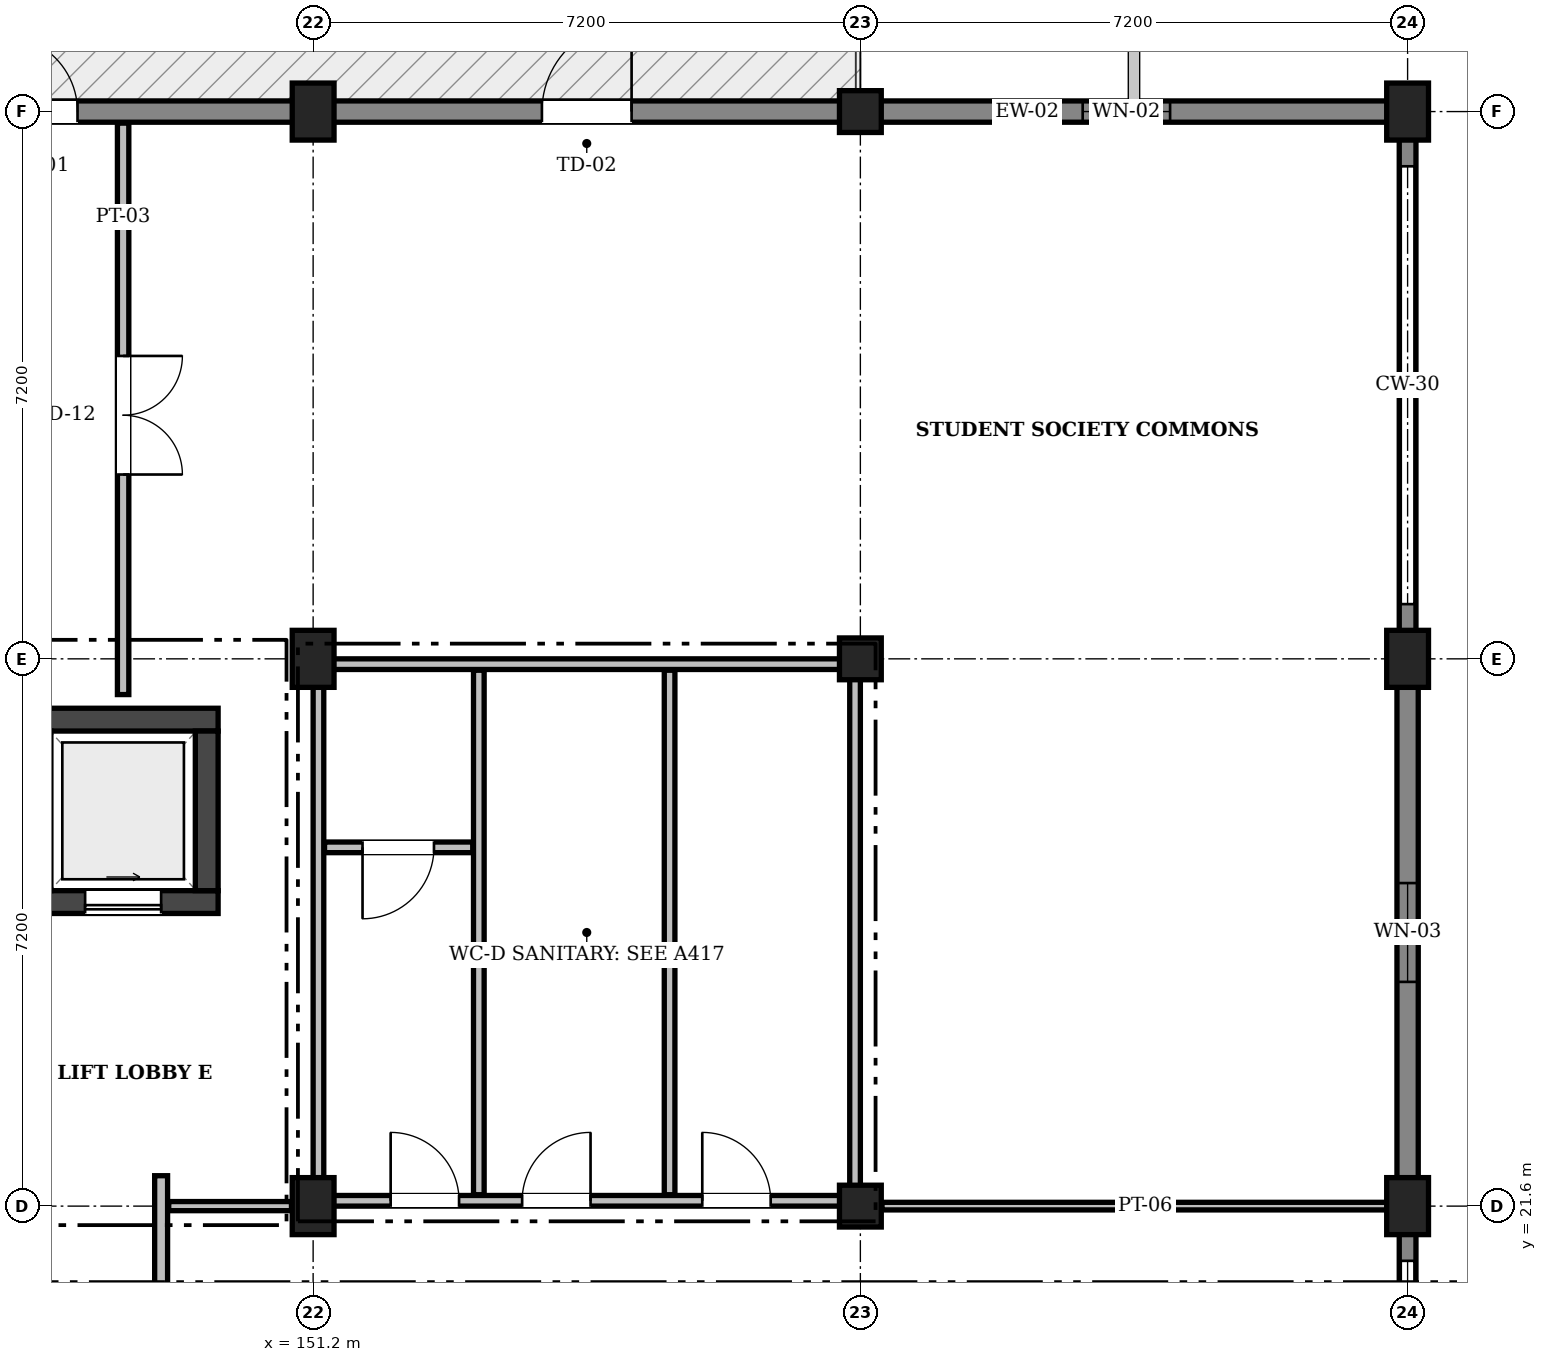
"""IFC4 building model, lengths in metres.
Left out: names, types, materials, properties, quantities, classifications, styles, units other than length and angle.
Written with IfcOpenShell. Run it as: python <this file> out.ifc"""

import sys

from ifc_helpers import new_model, si_unit, direction, frame, frame_2d, origin, origin_2d, place, context, subcontext, project, spatial, rectangle, extrude, element, fill, save


model = new_model("IFC4")
c1 = context("Model", 3, precision=1e-05, world=origin(), true_north=direction((0.0, 1.0)))
c2 = subcontext(c1, "Body", "Model", "MODEL_VIEW")
j1 = project(units=[si_unit("LENGTHUNIT", "METRE"), si_unit("PLANEANGLEUNIT", "RADIAN")], contexts=[c1])
p1 = place(None, origin())
s1 = spatial("IfcSite", under=j1, at=p1, CompositionType="ELEMENT")
p2 = place(p1, origin())
s2 = spatial("IfcBuilding", under=s1, at=p2, CompositionType="ELEMENT")
p3 = place(p2, frame((0.0, 0.0, 9.6)))
s3 = spatial("IfcBuildingStorey", under=s2, at=p3, CompositionType="ELEMENT", Elevation=9.6)
for number, where, z_axis, x_axis in (
    (1, (151.2, 21.6, 0.0), (0.0, 0.0, 1.0), (1.0, 0.0, 0.0)),
    (2, (151.2, 28.8, 0.0), (0.0, 0.0, 1.0), (1.0, 0.0, 0.0)),
    (3, (151.2, 36.0, 0.0), (0.0, 0.0, 1.0), (1.0, 0.0, 0.0)),
):
    element("IfcColumn", number, at=place(p3, frame(where, z_axis=z_axis, x_axis=x_axis)), inside=s3, PredefinedType="COLUMN", context=c2, shape_type="SweptSolid", body=[
        extrude(rectangle(XDim=0.55, YDim=0.75, at=origin_2d()), origin(), (0.0, 0.0, 1.0), 4.8),
    ])
for number, where, z_axis, x_axis in (
    (4, (158.4, 21.6, 0.0), (0.0, 0.0, 1.0), (1.0, 0.0, 0.0)),
    (5, (158.4, 28.8, 0.0), (0.0, 0.0, 1.0), (1.0, 0.0, 0.0)),
    (6, (158.4, 36.0, 0.0), (0.0, 0.0, 1.0), (1.0, 0.0, 0.0)),
):
    element("IfcColumn", number, at=place(p3, frame(where, z_axis=z_axis, x_axis=x_axis)), inside=s3, PredefinedType="COLUMN", context=c2, shape_type="SweptSolid", body=[
        extrude(rectangle(XDim=0.55, YDim=0.55, at=origin_2d()), origin(), (0.0, 0.0, 1.0), 4.8),
    ])
for number, where, z_axis, x_axis in (
    (7, (165.6, 21.6, 0.0), (0.0, 0.0, 1.0), (1.0, 0.0, 0.0)),
    (8, (165.6, 28.8, 0.0), (0.0, 0.0, 1.0), (1.0, 0.0, 0.0)),
    (9, (165.6, 36.0, 0.0), (0.0, 0.0, 1.0), (1.0, 0.0, 0.0)),
):
    element("IfcColumn", number, at=place(p3, frame(where, z_axis=z_axis, x_axis=x_axis)), inside=s3, PredefinedType="COLUMN", context=c2, shape_type="SweptSolid", body=[
        extrude(rectangle(XDim=0.55, YDim=0.75, at=origin_2d()), origin(), (0.0, 0.0, 1.0), 4.8),
    ])
p4 = place(p3, frame((144.0, 36.0, 0.0), z_axis=(0.0, 0.0, 1.0), x_axis=(1.0, 0.0, 0.0)))
e10 = element("IfcWall", 10, at=p4, inside=s3, PredefinedType="SOLIDWALL", context=c2, shape_type="SweptSolid", body=[
    extrude(rectangle(XDim=7.2, YDim=0.28, at=frame_2d((3.6, 0.0))), origin(), (0.0, 0.0, 1.0), 4.52),
])
p5 = place(p4, frame((3.1, 0.0, 0.0)))
e11 = element("IfcOpeningElement", 11, at=p5, cuts=e10, PredefinedType="OPENING", context=c2, shape_type="SweptSolid", body=[
    extrude(rectangle(XDim=1.0, YDim=2.15, at=frame_2d((0.5, 1.075))), frame((0.0, 0.152, 0.0), z_axis=(0.0, -1.0, 0.0), x_axis=(1.0, 0.0, 0.0)), (0.0, 0.0, 1.0), 0.304),
])
p6 = place(p3, frame((151.2, 36.0, 0.0), z_axis=(0.0, 0.0, 1.0), x_axis=(1.0, 0.0, 0.0)))
e12 = element("IfcWall", 12, at=p6, inside=s3, PredefinedType="SOLIDWALL", context=c2, shape_type="SweptSolid", body=[
    extrude(rectangle(XDim=7.2, YDim=0.28, at=frame_2d((3.6, 0.0))), origin(), (0.0, 0.0, 1.0), 4.52),
])
p7 = place(p6, frame((3.01, 0.0, 0.0)))
e13 = element("IfcOpeningElement", 13, at=p7, cuts=e12, PredefinedType="OPENING", context=c2, shape_type="SweptSolid", body=[
    extrude(rectangle(XDim=1.18, YDim=2.18, at=frame_2d((0.59, 1.09))), frame((0.0, 0.152, 0.0), z_axis=(0.0, -1.0, 0.0), x_axis=(1.0, 0.0, 0.0)), (0.0, 0.0, 1.0), 0.304),
])
p8 = place(p3, frame((158.4, 36.0, 0.0), z_axis=(0.0, 0.0, 1.0), x_axis=(1.0, 0.0, 0.0)))
e14 = element("IfcWall", 14, at=p8, inside=s3, PredefinedType="SOLIDWALL", context=c2, shape_type="SweptSolid", body=[
    extrude(rectangle(XDim=7.35, YDim=0.28, at=frame_2d((3.675, 0.0))), origin(), (0.0, 0.0, 1.0), 4.52),
])
p9 = place(p8, frame((2.925, 0.0, 0.95)))
e15 = element("IfcOpeningElement", 15, at=p9, cuts=e14, PredefinedType="OPENING", context=c2, shape_type="SweptSolid", body=[
    extrude(rectangle(XDim=1.15, YDim=1.3, at=frame_2d((0.575, 0.65))), frame((0.0, 0.152, 0.0), z_axis=(0.0, -1.0, 0.0), x_axis=(1.0, 0.0, 0.0)), (0.0, 0.0, 1.0), 0.304),
])
p10 = place(p3, frame((165.6, 35.848, 0.0), z_axis=(0.0, 0.0, 1.0), x_axis=(0.0, -1.0, 0.0)))
e16 = element("IfcWall", 16, at=p10, inside=s3, PredefinedType="SOLIDWALL", context=c2, shape_type="SweptSolid", body=[
    extrude(rectangle(XDim=7.048, YDim=0.22, at=frame_2d((3.524, 0.0))), origin(), (0.0, 0.0, 1.0), 1.24),
])
p11 = place(p3, frame((165.6, 28.8, 0.0), z_axis=(0.0, 0.0, 1.0), x_axis=(0.0, -1.0, 0.0)))
e17 = element("IfcWall", 17, at=p11, inside=s3, PredefinedType="SOLIDWALL", context=c2, shape_type="SweptSolid", body=[
    extrude(rectangle(XDim=7.2, YDim=0.28, at=frame_2d((3.6, 0.0))), origin(), (0.0, 0.0, 1.0), 4.52),
])
p12 = place(p11, frame((2.95, 0.0, 0.95)))
e18 = element("IfcOpeningElement", 18, at=p12, cuts=e17, PredefinedType="OPENING", context=c2, shape_type="SweptSolid", body=[
    extrude(rectangle(XDim=1.3, YDim=1.3, at=frame_2d((0.65, 0.65))), frame((0.0, 0.152, 0.0), z_axis=(0.0, -1.0, 0.0), x_axis=(1.0, 0.0, 0.0)), (0.0, 0.0, 1.0), 0.304),
])
p13 = place(p3, frame((165.6, 21.6, 0.0), z_axis=(0.0, 0.0, 1.0), x_axis=(0.0, -1.0, 0.0)))
e19 = element("IfcWall", 19, at=p13, inside=s3, PredefinedType="SOLIDWALL", context=c2, shape_type="SweptSolid", body=[
    extrude(rectangle(XDim=7.2, YDim=0.22, at=frame_2d((3.6, 0.0))), origin(), (0.0, 0.0, 1.0), 1.24),
])
p14 = place(p3, frame((147.45, 25.6, 0.0), z_axis=(0.0, 0.0, 1.0), x_axis=(1.0, 0.0, 0.0)))
e20 = element("IfcWall", 20, at=p14, inside=s3, PredefinedType="SHEAR", context=c2, shape_type="SweptSolid", body=[
    extrude(rectangle(XDim=2.5, YDim=0.3, at=frame_2d((1.25, 0.0))), origin(), (0.0, 0.0, 1.0), 9.79),
])
p15 = place(p14, frame((0.75, 0.0, 0.0)))
e21 = element("IfcOpeningElement", 21, at=p15, cuts=e20, PredefinedType="OPENING", context=c2, shape_type="SweptSolid", body=[
    extrude(rectangle(XDim=1.0, YDim=2.1, at=frame_2d((0.5, 1.05))), frame((0.0, 0.162, 0.0), z_axis=(0.0, -1.0, 0.0), x_axis=(1.0, 0.0, 0.0)), (0.0, 0.0, 1.0), 0.324),
])
p16 = place(p3, frame((147.45, 28.0, 0.0), z_axis=(0.0, 0.0, 1.0), x_axis=(1.0, 0.0, 0.0)))
e22 = element("IfcWall", 22, at=p16, inside=s3, PredefinedType="SHEAR", context=c2, shape_type="SweptSolid", body=[
    extrude(rectangle(XDim=2.5, YDim=0.3, at=frame_2d((1.25, 0.0))), origin(), (0.0, 0.0, 1.0), 9.79),
])
p17 = place(p3, frame((149.8, 25.75, 0.0), z_axis=(0.0, 0.0, 1.0), x_axis=(0.0, 1.0, 0.0)))
e23 = element("IfcWall", 23, at=p17, inside=s3, PredefinedType="SHEAR", context=c2, shape_type="SweptSolid", body=[
    extrude(rectangle(XDim=2.1, YDim=0.3, at=frame_2d((1.05, 0.0))), origin(), (0.0, 0.0, 1.0), 9.79),
])
p18 = place(p3, frame((151.27, 21.67, 0.0), z_axis=(0.0, 0.0, 1.0), x_axis=(1.0, 0.0, 0.0)))
e24 = element("IfcWall", 24, at=p18, inside=s3, PredefinedType="PARTITIONING", context=c2, shape_type="SweptSolid", body=[
    extrude(rectangle(XDim=7.06, YDim=0.14, at=frame_2d((3.53, 0.0))), origin(), (0.0, 0.0, 1.0), 4.46),
])
p19 = place(p18, frame((0.95, 0.0, 0.0)))
e25 = element("IfcOpeningElement", 25, at=p19, cuts=e24, PredefinedType="OPENING", context=c2, shape_type="SweptSolid", body=[
    extrude(rectangle(XDim=0.9, YDim=2.08, at=frame_2d((0.45, 1.04))), frame((0.0, 0.082, 0.0), z_axis=(0.0, -1.0, 0.0), x_axis=(1.0, 0.0, 0.0)), (0.0, 0.0, 1.0), 0.164),
])
p20 = place(p18, frame((2.68, 0.0, 0.0)))
e26 = element("IfcOpeningElement", 26, at=p20, cuts=e24, PredefinedType="OPENING", context=c2, shape_type="SweptSolid", body=[
    extrude(rectangle(XDim=0.9, YDim=2.08, at=frame_2d((0.45, 1.04))), frame((0.0, 0.082, 0.0), z_axis=(0.0, -1.0, 0.0), x_axis=(1.0, 0.0, 0.0)), (0.0, 0.0, 1.0), 0.164),
])
p21 = place(p18, frame((5.05, 0.0, 0.0)))
e27 = element("IfcOpeningElement", 27, at=p21, cuts=e24, PredefinedType="OPENING", context=c2, shape_type="SweptSolid", body=[
    extrude(rectangle(XDim=0.9, YDim=2.08, at=frame_2d((0.45, 1.04))), frame((0.0, 0.082, 0.0), z_axis=(0.0, -1.0, 0.0), x_axis=(1.0, 0.0, 0.0)), (0.0, 0.0, 1.0), 0.164),
])
p22 = place(p3, frame((151.27, 28.73, 0.0), z_axis=(0.0, 0.0, 1.0), x_axis=(1.0, 0.0, 0.0)))
e28 = element("IfcWall", 28, at=p22, inside=s3, PredefinedType="PARTITIONING", context=c2, shape_type="SweptSolid", body=[
    extrude(rectangle(XDim=7.06, YDim=0.14, at=frame_2d((3.53, 0.0))), origin(), (0.0, 0.0, 1.0), 4.46),
])
for number, where, z_axis, x_axis in (
    (29, (151.27, 21.75, 0.0), (0.0, 0.0, 1.0), (0.0, 1.0, 0.0)),
    (30, (158.33, 21.75, 0.0), (0.0, 0.0, 1.0), (0.0, 1.0, 0.0)),
    (31, (153.38, 21.75, 0.0), (0.0, 0.0, 1.0), (0.0, 1.0, 0.0)),
    (32, (155.89, 21.75, 0.0), (0.0, 0.0, 1.0), (0.0, 1.0, 0.0)),
):
    element("IfcWall", number, at=place(p3, frame(where, z_axis=z_axis, x_axis=x_axis)), inside=s3, PredefinedType="PARTITIONING", context=c2, shape_type="SweptSolid", body=[
        extrude(rectangle(XDim=6.9, YDim=0.14, at=frame_2d((3.45, 0.0))), origin(), (0.0, 0.0, 1.0), 4.46),
    ])
p23 = place(p3, frame((151.35, 26.32, 0.0), z_axis=(0.0, 0.0, 1.0), x_axis=(1.0, 0.0, 0.0)))
e33 = element("IfcWall", 33, at=p23, inside=s3, PredefinedType="PARTITIONING", context=c2, shape_type="SweptSolid", body=[
    extrude(rectangle(XDim=1.95, YDim=0.14, at=frame_2d((0.975, 0.0))), origin(), (0.0, 0.0, 1.0), 4.46),
])
p24 = place(p23, frame((0.5, 0.0, 0.0)))
e34 = element("IfcOpeningElement", 34, at=p24, cuts=e33, PredefinedType="OPENING", context=c2, shape_type="SweptSolid", body=[
    extrude(rectangle(XDim=0.94, YDim=2.1, at=frame_2d((0.47, 1.05))), frame((0.0, 0.082, 0.0), z_axis=(0.0, -1.0, 0.0), x_axis=(1.0, 0.0, 0.0)), (0.0, 0.0, 1.0), 0.164),
])
p25 = place(p3, frame((149.2, 17.96, 0.0), z_axis=(0.0, 0.0, 1.0), x_axis=(0.0, 1.0, 0.0)))
e35 = element("IfcWall", 35, at=p25, inside=s3, PredefinedType="PARTITIONING", context=c2, shape_type="SweptSolid", body=[
    extrude(rectangle(XDim=4.04, YDim=0.17, at=frame_2d((2.02, 0.0))), origin(), (0.0, 0.0, 1.0), 4.46),
])
p26 = place(p3, frame((149.3, 21.6, 0.0), z_axis=(0.0, 0.0, 1.0), x_axis=(1.0, 0.0, 0.0)))
e36 = element("IfcWall", 36, at=p26, inside=s3, PredefinedType="PARTITIONING", context=c2, shape_type="SweptSolid", body=[
    extrude(rectangle(XDim=1.615, YDim=0.12, at=frame_2d((0.808, 0.0))), origin(), (0.0, 0.0, 1.0), 4.46),
])
p27 = place(p3, frame((158.685, 21.6, 0.0), z_axis=(0.0, 0.0, 1.0), x_axis=(1.0, 0.0, 0.0)))
e37 = element("IfcWall", 37, at=p27, inside=s3, PredefinedType="PARTITIONING", context=c2, shape_type="SweptSolid", body=[
    extrude(rectangle(XDim=6.763, YDim=0.1, at=frame_2d((3.381, 0.0))), origin(), (0.0, 0.0, 1.0), 4.46),
])
p28 = place(p3, frame((148.7, 28.33, 0.0), z_axis=(0.0, 0.0, 1.0), x_axis=(0.0, 1.0, 0.0)))
e38 = element("IfcWall", 38, at=p28, inside=s3, PredefinedType="PARTITIONING", context=c2, shape_type="SweptSolid", body=[
    extrude(rectangle(XDim=7.518, YDim=0.15, at=frame_2d((3.759, 0.0))), origin(), (0.0, 0.0, 1.0), 4.46),
])
p29 = place(p28, frame((2.895, 0.0, 0.0)))
e39 = element("IfcOpeningElement", 39, at=p29, cuts=e38, PredefinedType="OPENING", context=c2, shape_type="SweptSolid", body=[
    extrude(rectangle(XDim=1.56, YDim=2.26, at=frame_2d((0.78, 1.13))), frame((0.0, 0.087, 0.0), z_axis=(0.0, -1.0, 0.0), x_axis=(1.0, 0.0, 0.0)), (0.0, 0.0, 1.0), 0.174),
])
p30 = place(p5, origin())
e40 = element("IfcDoor", 40, at=p30, inside=s3, OperationType="SINGLE_SWING_LEFT", PredefinedType="DOOR", context=c2, shape_type="SweptSolid", body=[
    extrude(rectangle(XDim=1.0, YDim=2.15, at=frame_2d((0.5, 1.075))), frame((0.0, 0.025, 0.0), z_axis=(0.0, -1.0, 0.0), x_axis=(1.0, 0.0, 0.0)), (0.0, 0.0, 1.0), 0.05),
])
fill(e11, e40)
p31 = place(p7, origin())
e41 = element("IfcDoor", 41, at=p31, inside=s3, OperationType="SINGLE_SWING_RIGHT", PredefinedType="DOOR", context=c2, shape_type="SweptSolid", body=[
    extrude(rectangle(XDim=1.18, YDim=2.18, at=frame_2d((0.59, 1.09))), frame((0.0, 0.025, 0.0), z_axis=(0.0, -1.0, 0.0), x_axis=(1.0, 0.0, 0.0)), (0.0, 0.0, 1.0), 0.05),
])
fill(e13, e41)
p32 = place(p9, origin())
e42 = element("IfcWindow", 42, at=p32, inside=s3, PartitioningType="SINGLE_PANEL", PredefinedType="WINDOW", context=c2, shape_type="SweptSolid", body=[
    extrude(rectangle(XDim=1.15, YDim=1.3, at=frame_2d((0.575, 0.65))), frame((0.0, 0.03, 0.0), z_axis=(0.0, -1.0, 0.0), x_axis=(1.0, 0.0, 0.0)), (0.0, 0.0, 1.0), 0.06),
])
fill(e15, e42)
p33 = place(p12, origin())
e43 = element("IfcWindow", 43, at=p33, inside=s3, PartitioningType="SINGLE_PANEL", PredefinedType="WINDOW", context=c2, shape_type="SweptSolid", body=[
    extrude(rectangle(XDim=1.3, YDim=1.3, at=frame_2d((0.65, 0.65))), frame((0.0, 0.03, 0.0), z_axis=(0.0, -1.0, 0.0), x_axis=(1.0, 0.0, 0.0)), (0.0, 0.0, 1.0), 0.06),
])
fill(e18, e43)
p34 = place(p15, frame((1.0, 0.0, 0.0), z_axis=(0.0, 0.0, 1.0), x_axis=(-1.0, 0.0, 0.0)))
e44 = element("IfcDoor", 44, at=p34, inside=s3, OperationType="SLIDING_TO_RIGHT", PredefinedType="DOOR", context=c2, shape_type="SweptSolid", body=[
    extrude(rectangle(XDim=1.0, YDim=2.1, at=frame_2d((0.5, 1.05))), frame((0.0, 0.025, 0.0), z_axis=(0.0, -1.0, 0.0), x_axis=(1.0, 0.0, 0.0)), (0.0, 0.0, 1.0), 0.05),
])
fill(e21, e44)
p35 = place(p19, origin())
e45 = element("IfcDoor", 45, at=p35, inside=s3, OperationType="SINGLE_SWING_LEFT", PredefinedType="DOOR", context=c2, shape_type="SweptSolid", body=[
    extrude(rectangle(XDim=0.9, YDim=2.08, at=frame_2d((0.45, 1.04))), frame((0.0, 0.025, 0.0), z_axis=(0.0, -1.0, 0.0), x_axis=(1.0, 0.0, 0.0)), (0.0, 0.0, 1.0), 0.05),
])
fill(e25, e45)
p36 = place(p20, origin())
e46 = element("IfcDoor", 46, at=p36, inside=s3, OperationType="SINGLE_SWING_RIGHT", PredefinedType="DOOR", context=c2, shape_type="SweptSolid", body=[
    extrude(rectangle(XDim=0.9, YDim=2.08, at=frame_2d((0.45, 1.04))), frame((0.0, 0.025, 0.0), z_axis=(0.0, -1.0, 0.0), x_axis=(1.0, 0.0, 0.0)), (0.0, 0.0, 1.0), 0.05),
])
fill(e26, e46)
p37 = place(p21, origin())
e47 = element("IfcDoor", 47, at=p37, inside=s3, OperationType="SINGLE_SWING_LEFT", PredefinedType="DOOR", context=c2, shape_type="SweptSolid", body=[
    extrude(rectangle(XDim=0.9, YDim=2.08, at=frame_2d((0.45, 1.04))), frame((0.0, 0.025, 0.0), z_axis=(0.0, -1.0, 0.0), x_axis=(1.0, 0.0, 0.0)), (0.0, 0.0, 1.0), 0.05),
])
fill(e27, e47)
p38 = place(p24, frame((0.94, 0.0, 0.0), z_axis=(0.0, 0.0, 1.0), x_axis=(-1.0, 0.0, 0.0)))
e48 = element("IfcDoor", 48, at=p38, inside=s3, OperationType="SINGLE_SWING_RIGHT", PredefinedType="DOOR", context=c2, shape_type="SweptSolid", body=[
    extrude(rectangle(XDim=0.94, YDim=2.1, at=frame_2d((0.47, 1.05))), frame((0.0, 0.025, 0.0), z_axis=(0.0, -1.0, 0.0), x_axis=(1.0, 0.0, 0.0)), (0.0, 0.0, 1.0), 0.05),
])
fill(e34, e48)
p39 = place(p29, frame((1.56, 0.0, 0.0), z_axis=(0.0, 0.0, 1.0), x_axis=(-1.0, 0.0, 0.0)))
e49 = element("IfcDoor", 49, at=p39, inside=s3, OperationType="DOUBLE_DOOR_SINGLE_SWING", PredefinedType="DOOR", context=c2, shape_type="SweptSolid", body=[
    extrude(rectangle(XDim=1.56, YDim=2.26, at=frame_2d((0.78, 1.13))), frame((0.0, 0.025, 0.0), z_axis=(0.0, -1.0, 0.0), x_axis=(1.0, 0.0, 0.0)), (0.0, 0.0, 1.0), 0.05),
])
fill(e39, e49)
save(model, sys.argv[1])
